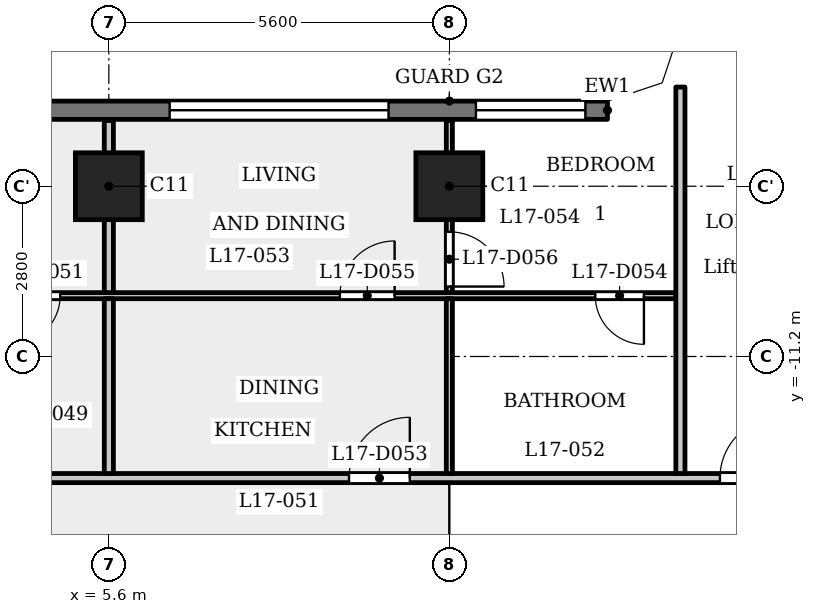
"""IFC4 building model, lengths in metres.
Left out: names, types, materials, properties, quantities, classifications, styles, units other than length and angle.
Written with IfcOpenShell. Run it as: python <this file> out.ifc"""

import sys

from ifc_helpers import new_model, si_unit, direction, frame, frame_2d, origin, origin_2d, place, context, subcontext, project, spatial, polyline, rectangle, outline, extrude, element, fill, save


model = new_model("IFC4")
c1 = context("Model", 3, precision=1e-05, world=origin(), true_north=direction((0.0, 1.0)))
c2 = subcontext(c1, "Body", "Model", "MODEL_VIEW")
j1 = project(units=[si_unit("LENGTHUNIT", "METRE"), si_unit("PLANEANGLEUNIT", "RADIAN")], contexts=[c1])
p1 = place(None, origin())
s1 = spatial("IfcSite", under=j1, at=p1, CompositionType="ELEMENT")
p2 = place(p1, origin())
s2 = spatial("IfcBuilding", under=s1, at=p2, CompositionType="ELEMENT")
p3 = place(p2, frame((0.0, 0.0, 69.0)))
s3 = spatial("IfcBuildingStorey", under=s2, at=p3, CompositionType="ELEMENT", Elevation=69.0)
for number, where, z_axis, x_axis in (
    (1, (5.6, -8.4, 0.0), (0.0, 0.0, 1.0), (1.0, 0.0, 0.0)),
    (2, (11.2, -8.4, 0.0), (0.0, 0.0, 1.0), (1.0, 0.0, 0.0)),
):
    element("IfcColumn", number, at=place(p3, frame(where, z_axis=z_axis, x_axis=x_axis)), inside=s3, PredefinedType="COLUMN", context=c2, shape_type="SweptSolid", body=[
        extrude(rectangle(XDim=1.1, YDim=1.1, at=origin_2d()), origin(), (0.0, 0.0, 1.0), 3.5),
    ])
p4 = place(p3, frame((13.8, -7.15, 0.0), z_axis=(0.0, 0.0, 1.0), x_axis=(-1.0, 0.0, 0.0)))
e3 = element("IfcWall", 3, at=p4, inside=s3, PredefinedType="SOLIDWALL", context=c2, shape_type="SweptSolid", body=[
    extrude(rectangle(XDim=27.6, YDim=0.3, at=frame_2d((13.8, 0.0))), origin(), (0.0, 0.0, 1.0), 3.15),
])
p5 = place(p4, frame((0.363, 0.0, 0.9)))
e4 = element("IfcOpeningElement", 4, at=p5, cuts=e3, PredefinedType="OPENING", context=c2, shape_type="SweptSolid", body=[
    extrude(rectangle(XDim=1.8, YDim=1.25, at=frame_2d((0.9, 0.625))), frame((0.0, 0.16, 0.0), z_axis=(0.0, -1.0, 0.0), x_axis=(1.0, 0.0, 0.0)), (0.0, 0.0, 1.0), 0.32),
])
p6 = place(p4, frame((3.6, 0.0, 1.2)))
e5 = element("IfcOpeningElement", 5, at=p6, cuts=e3, PredefinedType="OPENING", context=c2, shape_type="SweptSolid", body=[
    extrude(rectangle(XDim=3.6, YDim=0.95, at=frame_2d((1.8, 0.475))), frame((0.0, 0.16, 0.0), z_axis=(0.0, -1.0, 0.0), x_axis=(1.0, 0.0, 0.0)), (0.0, 0.0, 1.0), 0.32),
])
p7 = place(p4, frame((9.2, 0.0, 1.2)))
e6 = element("IfcOpeningElement", 6, at=p7, cuts=e3, PredefinedType="OPENING", context=c2, shape_type="SweptSolid", body=[
    extrude(rectangle(XDim=3.6, YDim=0.95, at=frame_2d((1.8, 0.475))), frame((0.0, 0.16, 0.0), z_axis=(0.0, -1.0, 0.0), x_axis=(1.0, 0.0, 0.0)), (0.0, 0.0, 1.0), 0.32),
])
p8 = place(p4, frame((14.8, 0.0, 1.2)))
e7 = element("IfcOpeningElement", 7, at=p8, cuts=e3, PredefinedType="OPENING", context=c2, shape_type="SweptSolid", body=[
    extrude(rectangle(XDim=3.6, YDim=0.95, at=frame_2d((1.8, 0.475))), frame((0.0, 0.16, 0.0), z_axis=(0.0, -1.0, 0.0), x_axis=(1.0, 0.0, 0.0)), (0.0, 0.0, 1.0), 0.32),
])
p9 = place(p4, frame((20.4, 0.0, 1.2)))
e8 = element("IfcOpeningElement", 8, at=p9, cuts=e3, PredefinedType="OPENING", context=c2, shape_type="SweptSolid", body=[
    extrude(rectangle(XDim=3.6, YDim=0.95, at=frame_2d((1.8, 0.475))), frame((0.0, 0.16, 0.0), z_axis=(0.0, -1.0, 0.0), x_axis=(1.0, 0.0, 0.0)), (0.0, 0.0, 1.0), 0.32),
])
p10 = place(p4, frame((25.438, 0.0, 0.9)))
e9 = element("IfcOpeningElement", 9, at=p10, cuts=e3, PredefinedType="OPENING", context=c2, shape_type="SweptSolid", body=[
    extrude(rectangle(XDim=1.8, YDim=1.25, at=frame_2d((0.9, 0.625))), frame((0.0, 0.16, 0.0), z_axis=(0.0, -1.0, 0.0), x_axis=(1.0, 0.0, 0.0)), (0.0, 0.0, 1.0), 0.32),
])
p11 = place(p3, frame((-17.4, -13.2, 0.0), z_axis=(0.0, 0.0, 1.0), x_axis=(1.0, 0.0, 0.0)))
e10 = element("IfcWall", 10, at=p11, inside=s3, PredefinedType="PARTITIONING", context=c2, shape_type="SweptSolid", body=[
    extrude(rectangle(XDim=34.8, YDim=0.15, at=frame_2d((17.4, 0.0))), origin(), (0.0, 0.0, 1.0), 3.15),
])
p12 = place(p11, frame((0.65, 0.0, 0.0)))
e11 = element("IfcOpeningElement", 11, at=p12, cuts=e10, PredefinedType="OPENING", context=c2, shape_type="SweptSolid", body=[
    extrude(rectangle(XDim=1.0, YDim=2.1, at=frame_2d((0.5, 1.05))), frame((0.0, 0.085, 0.0), z_axis=(0.0, -1.0, 0.0), x_axis=(1.0, 0.0, 0.0)), (0.0, 0.0, 1.0), 0.17),
])
p13 = place(p11, frame((33.05, 0.0, 0.0)))
e12 = element("IfcOpeningElement", 12, at=p13, cuts=e10, PredefinedType="OPENING", context=c2, shape_type="SweptSolid", body=[
    extrude(rectangle(XDim=1.0, YDim=2.1, at=frame_2d((0.5, 1.05))), frame((0.0, 0.085, 0.0), z_axis=(0.0, -1.0, 0.0), x_axis=(1.0, 0.0, 0.0)), (0.0, 0.0, 1.0), 0.17),
])
p14 = place(p11, frame((4.55, 0.0, 0.0)))
e13 = element("IfcOpeningElement", 13, at=p14, cuts=e10, PredefinedType="OPENING", context=c2, shape_type="SweptSolid", body=[
    extrude(rectangle(XDim=1.0, YDim=2.1, at=frame_2d((0.5, 1.05))), frame((0.0, 0.085, 0.0), z_axis=(0.0, -1.0, 0.0), x_axis=(1.0, 0.0, 0.0)), (0.0, 0.0, 1.0), 0.17),
])
p15 = place(p11, frame((15.75, 0.0, 0.0)))
e14 = element("IfcOpeningElement", 14, at=p15, cuts=e10, PredefinedType="OPENING", context=c2, shape_type="SweptSolid", body=[
    extrude(rectangle(XDim=1.0, YDim=2.1, at=frame_2d((0.5, 1.05))), frame((0.0, 0.085, 0.0), z_axis=(0.0, -1.0, 0.0), x_axis=(1.0, 0.0, 0.0)), (0.0, 0.0, 1.0), 0.17),
])
p16 = place(p11, frame((18.1, 0.0, 0.0)))
e15 = element("IfcOpeningElement", 15, at=p16, cuts=e10, PredefinedType="OPENING", context=c2, shape_type="SweptSolid", body=[
    extrude(rectangle(XDim=1.0, YDim=2.1, at=frame_2d((0.5, 1.05))), frame((0.0, 0.085, 0.0), z_axis=(0.0, -1.0, 0.0), x_axis=(1.0, 0.0, 0.0)), (0.0, 0.0, 1.0), 0.17),
])
p17 = place(p11, frame((26.95, 0.0, 0.0)))
e16 = element("IfcOpeningElement", 16, at=p17, cuts=e10, PredefinedType="OPENING", context=c2, shape_type="SweptSolid", body=[
    extrude(rectangle(XDim=1.0, YDim=2.1, at=frame_2d((0.5, 1.05))), frame((0.0, 0.085, 0.0), z_axis=(0.0, -1.0, 0.0), x_axis=(1.0, 0.0, 0.0)), (0.0, 0.0, 1.0), 0.17),
])
p18 = place(p3, frame((-14.925, -10.2, 0.0), z_axis=(0.0, 0.0, 1.0), x_axis=(1.0, 0.0, 0.0)))
e17 = element("IfcWall", 17, at=p18, inside=s3, PredefinedType="PARTITIONING", context=c2, shape_type="SweptSolid", body=[
    extrude(rectangle(XDim=29.85, YDim=0.1, at=frame_2d((14.925, 0.0))), origin(), (0.0, 0.0, 1.0), 3.15),
])
p19 = place(p18, frame((7.625, 0.0, 0.0)))
e18 = element("IfcOpeningElement", 18, at=p19, cuts=e17, PredefinedType="OPENING", context=c2, shape_type="SweptSolid", body=[
    extrude(rectangle(XDim=0.8, YDim=2.1, at=frame_2d((0.4, 1.05))), frame((0.0, 0.06, 0.0), z_axis=(0.0, -1.0, 0.0), x_axis=(1.0, 0.0, 0.0)), (0.0, 0.0, 1.0), 0.12),
])
p20 = place(p18, frame((1.925, 0.0, 0.0)))
e19 = element("IfcOpeningElement", 19, at=p20, cuts=e17, PredefinedType="OPENING", context=c2, shape_type="SweptSolid", body=[
    extrude(rectangle(XDim=0.9, YDim=2.1, at=frame_2d((0.45, 1.05))), frame((0.0, 0.06, 0.0), z_axis=(0.0, -1.0, 0.0), x_axis=(1.0, 0.0, 0.0)), (0.0, 0.0, 1.0), 0.12),
])
p21 = place(p18, frame((10.225, 0.0, 0.0)))
e20 = element("IfcOpeningElement", 20, at=p21, cuts=e17, PredefinedType="OPENING", context=c2, shape_type="SweptSolid", body=[
    extrude(rectangle(XDim=0.8, YDim=2.1, at=frame_2d((0.4, 1.05))), frame((0.0, 0.06, 0.0), z_axis=(0.0, -1.0, 0.0), x_axis=(1.0, 0.0, 0.0)), (0.0, 0.0, 1.0), 0.12),
])
p22 = place(p18, frame((13.125, 0.0, 0.0)))
e21 = element("IfcOpeningElement", 21, at=p22, cuts=e17, PredefinedType="OPENING", context=c2, shape_type="SweptSolid", body=[
    extrude(rectangle(XDim=0.9, YDim=2.1, at=frame_2d((0.45, 1.05))), frame((0.0, 0.06, 0.0), z_axis=(0.0, -1.0, 0.0), x_axis=(1.0, 0.0, 0.0)), (0.0, 0.0, 1.0), 0.12),
])
p23 = place(p18, frame((18.925, 0.0, 0.0)))
e22 = element("IfcOpeningElement", 22, at=p23, cuts=e17, PredefinedType="OPENING", context=c2, shape_type="SweptSolid", body=[
    extrude(rectangle(XDim=0.8, YDim=2.1, at=frame_2d((0.4, 1.05))), frame((0.0, 0.06, 0.0), z_axis=(0.0, -1.0, 0.0), x_axis=(1.0, 0.0, 0.0)), (0.0, 0.0, 1.0), 0.12),
])
p24 = place(p18, frame((15.725, 0.0, 0.0)))
e23 = element("IfcOpeningElement", 23, at=p24, cuts=e17, PredefinedType="OPENING", context=c2, shape_type="SweptSolid", body=[
    extrude(rectangle(XDim=0.9, YDim=2.1, at=frame_2d((0.45, 1.05))), frame((0.0, 0.06, 0.0), z_axis=(0.0, -1.0, 0.0), x_axis=(1.0, 0.0, 0.0)), (0.0, 0.0, 1.0), 0.12),
])
p25 = place(p18, frame((28.525, 0.0, 0.0)))
e24 = element("IfcOpeningElement", 24, at=p25, cuts=e17, PredefinedType="OPENING", context=c2, shape_type="SweptSolid", body=[
    extrude(rectangle(XDim=0.8, YDim=2.1, at=frame_2d((0.4, 1.05))), frame((0.0, 0.06, 0.0), z_axis=(0.0, -1.0, 0.0), x_axis=(1.0, 0.0, 0.0)), (0.0, 0.0, 1.0), 0.12),
])
p26 = place(p18, frame((24.325, 0.0, 0.0)))
e25 = element("IfcOpeningElement", 25, at=p26, cuts=e17, PredefinedType="OPENING", context=c2, shape_type="SweptSolid", body=[
    extrude(rectangle(XDim=0.9, YDim=2.1, at=frame_2d((0.45, 1.05))), frame((0.0, 0.06, 0.0), z_axis=(0.0, -1.0, 0.0), x_axis=(1.0, 0.0, 0.0)), (0.0, 0.0, 1.0), 0.12),
])
p27 = place(p3, frame((5.6, -13.125, 0.0), z_axis=(0.0, 0.0, 1.0), x_axis=(0.0, 1.0, 0.0)))
e26 = element("IfcWall", 26, at=p27, inside=s3, PredefinedType="PARTITIONING", context=c2, shape_type="SweptSolid", body=[
    extrude(rectangle(XDim=2.875, YDim=0.15, at=frame_2d((1.438, 0.0))), origin(), (0.0, 0.0, 1.0), 3.15),
])
p28 = place(p3, frame((5.6, -10.15, 0.0), z_axis=(0.0, 0.0, 1.0), x_axis=(0.0, 1.0, 0.0)))
e27 = element("IfcWall", 27, at=p28, inside=s3, PredefinedType="PARTITIONING", context=c2, shape_type="SweptSolid", body=[
    extrude(rectangle(XDim=2.83, YDim=0.15, at=frame_2d((1.415, 0.0))), origin(), (0.0, 0.0, 1.0), 3.15),
])
p29 = place(p3, frame((11.2, -13.125, 0.0), z_axis=(0.0, 0.0, 1.0), x_axis=(0.0, 1.0, 0.0)))
e28 = element("IfcWall", 28, at=p29, inside=s3, PredefinedType="PARTITIONING", context=c2, shape_type="SweptSolid", body=[
    extrude(rectangle(XDim=2.875, YDim=0.1, at=frame_2d((1.438, 0.0))), origin(), (0.0, 0.0, 1.0), 3.15),
])
p30 = place(p3, frame((11.2, -10.15, 0.0), z_axis=(0.0, 0.0, 1.0), x_axis=(0.0, 1.0, 0.0)))
e29 = element("IfcWall", 29, at=p30, inside=s3, PredefinedType="PARTITIONING", context=c2, shape_type="SweptSolid", body=[
    extrude(rectangle(XDim=2.83, YDim=0.1, at=frame_2d((1.415, 0.0))), origin(), (0.0, 0.0, 1.0), 3.15),
])
p31 = place(p30, frame((0.1, 0.0, 0.0)))
e30 = element("IfcOpeningElement", 30, at=p31, cuts=e29, PredefinedType="OPENING", context=c2, shape_type="SweptSolid", body=[
    extrude(rectangle(XDim=0.9, YDim=2.1, at=frame_2d((0.45, 1.05))), frame((0.0, 0.06, 0.0), z_axis=(0.0, -1.0, 0.0), x_axis=(1.0, 0.0, 0.0)), (0.0, 0.0, 1.0), 0.12),
])
p32 = place(p3, frame((15.0, -13.125, 0.0), z_axis=(0.0, 0.0, 1.0), x_axis=(0.0, 1.0, 0.0)))
e31 = element("IfcWall", 31, at=p32, inside=s3, PredefinedType="PARTITIONING", context=c2, shape_type="SweptSolid", body=[
    extrude(rectangle(XDim=6.356, YDim=0.15, at=frame_2d((3.178, 0.0))), origin(), (0.0, 0.0, 1.0), 3.15),
])
p33 = place(p3, origin())
e32 = element("IfcWall", 32, at=p33, inside=s3, PredefinedType="SOLIDWALL", context=c2, shape_type="SweptSolid", body=[
    extrude(outline(polyline([(14.937, -6.937), (15.3, -5.849), (15.3, -5.8), (15.0, -5.8), (14.7, -6.7), (13.8, -7.0), (13.8, -7.3), (13.849, -7.3), (14.937, -6.937)])), origin(), (0.0, 0.0, 1.0), 3.15),
])
p34 = place(p13, origin())
e33 = element("IfcDoor", 33, at=p34, inside=s3, OperationType="SINGLE_SWING_LEFT", PredefinedType="DOOR", context=c2, shape_type="SweptSolid", body=[
    extrude(rectangle(XDim=1.0, YDim=2.1, at=frame_2d((0.5, 1.05))), frame((0.0, 0.025, 0.0), z_axis=(0.0, -1.0, 0.0), x_axis=(1.0, 0.0, 0.0)), (0.0, 0.0, 1.0), 0.05),
])
fill(e12, e33)
p35 = place(p23, origin())
e34 = element("IfcDoor", 34, at=p35, inside=s3, OperationType="SINGLE_SWING_LEFT", PredefinedType="DOOR", context=c2, shape_type="SweptSolid", body=[
    extrude(rectangle(XDim=0.8, YDim=2.1, at=frame_2d((0.4, 1.05))), frame((0.0, 0.025, 0.0), z_axis=(0.0, -1.0, 0.0), x_axis=(1.0, 0.0, 0.0)), (0.0, 0.0, 1.0), 0.05),
])
fill(e22, e34)
p36 = place(p17, origin())
e35 = element("IfcDoor", 35, at=p36, inside=s3, OperationType="SINGLE_SWING_LEFT", PredefinedType="DOOR", context=c2, shape_type="SweptSolid", body=[
    extrude(rectangle(XDim=1.0, YDim=2.1, at=frame_2d((0.5, 1.05))), frame((0.0, 0.025, 0.0), z_axis=(0.0, -1.0, 0.0), x_axis=(1.0, 0.0, 0.0)), (0.0, 0.0, 1.0), 0.05),
])
fill(e16, e35)
p37 = place(p25, origin())
e36 = element("IfcDoor", 36, at=p37, inside=s3, OperationType="SINGLE_SWING_RIGHT", PredefinedType="DOOR", context=c2, shape_type="SweptSolid", body=[
    extrude(rectangle(XDim=0.8, YDim=2.1, at=frame_2d((0.4, 1.05))), frame((0.0, 0.025, 0.0), z_axis=(0.0, -1.0, 0.0), x_axis=(1.0, 0.0, 0.0)), (0.0, 0.0, 1.0), 0.05),
])
fill(e24, e36)
p38 = place(p26, origin())
e37 = element("IfcDoor", 37, at=p38, inside=s3, OperationType="SINGLE_SWING_LEFT", PredefinedType="DOOR", context=c2, shape_type="SweptSolid", body=[
    extrude(rectangle(XDim=0.9, YDim=2.1, at=frame_2d((0.45, 1.05))), frame((0.0, 0.025, 0.0), z_axis=(0.0, -1.0, 0.0), x_axis=(1.0, 0.0, 0.0)), (0.0, 0.0, 1.0), 0.05),
])
fill(e25, e37)
p39 = place(p31, origin())
e38 = element("IfcDoor", 38, at=p39, inside=s3, OperationType="SINGLE_SWING_LEFT", PredefinedType="DOOR", context=c2, shape_type="SweptSolid", body=[
    extrude(rectangle(XDim=0.9, YDim=2.1, at=frame_2d((0.45, 1.05))), frame((0.0, 0.025, 0.0), z_axis=(0.0, -1.0, 0.0), x_axis=(1.0, 0.0, 0.0)), (0.0, 0.0, 1.0), 0.05),
])
fill(e30, e38)
p40 = place(p5, origin())
e39 = element("IfcWindow", 39, at=p40, inside=s3, PartitioningType="SINGLE_PANEL", PredefinedType="WINDOW", context=c2, shape_type="SweptSolid", body=[
    extrude(rectangle(XDim=1.8, YDim=1.25, at=frame_2d((0.9, 0.625))), frame((0.0, 0.03, 0.0), z_axis=(0.0, -1.0, 0.0), x_axis=(1.0, 0.0, 0.0)), (0.0, 0.0, 1.0), 0.06),
])
fill(e4, e39)
p41 = place(p6, origin())
e40 = element("IfcWindow", 40, at=p41, inside=s3, PartitioningType="SINGLE_PANEL", PredefinedType="WINDOW", context=c2, shape_type="SweptSolid", body=[
    extrude(rectangle(XDim=3.6, YDim=0.95, at=frame_2d((1.8, 0.475))), frame((0.0, 0.03, 0.0), z_axis=(0.0, -1.0, 0.0), x_axis=(1.0, 0.0, 0.0)), (0.0, 0.0, 1.0), 0.06),
])
fill(e5, e40)
save(model, sys.argv[1])
